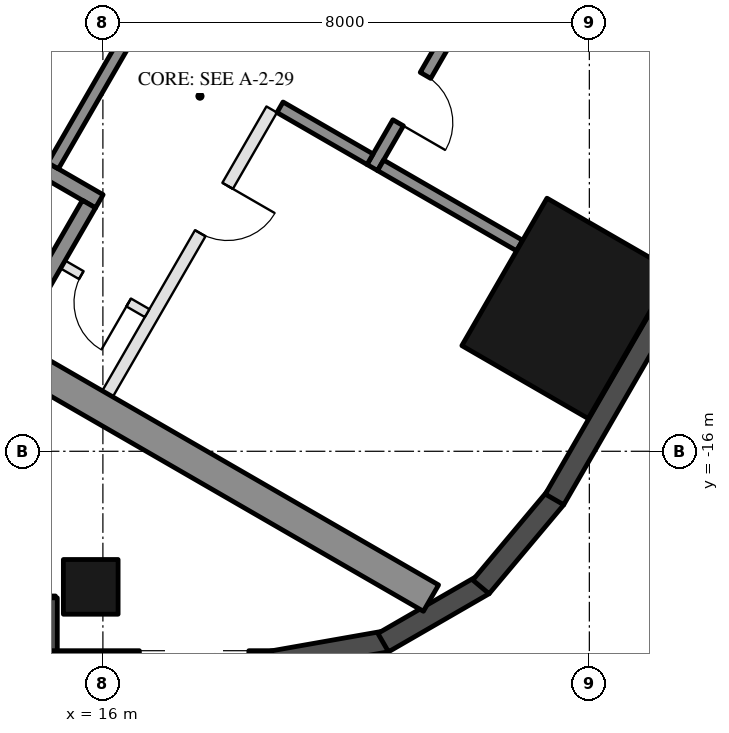
"""IFC4 building model, lengths in metres.
Left out: names, types, materials, properties, quantities, classifications, styles, units other than length and angle.
Written with IfcOpenShell. Run it as: python <this file> out.ifc"""

import sys

from ifc_helpers import new_model, si_unit, direction, frame, frame_2d, origin, origin_2d, place, context, subcontext, project, spatial, rectangle, hollow_rectangle, extrude, element, fill, save


model = new_model("IFC4")
c1 = context("Model", 3, precision=1e-05, world=origin(), true_north=direction((0.0, 1.0)))
c2 = subcontext(c1, "Body", "Model", "MODEL_VIEW")
j1 = project(units=[si_unit("LENGTHUNIT", "METRE"), si_unit("PLANEANGLEUNIT", "RADIAN")], contexts=[c1])
p1 = place(None, origin())
s1 = spatial("IfcSite", under=j1, at=p1, CompositionType="ELEMENT")
p2 = place(p1, origin())
s2 = spatial("IfcBuilding", under=s1, at=p2, CompositionType="ELEMENT")
p3 = place(p2, frame((0.0, 0.0, 127.9)))
s3 = spatial("IfcBuildingStorey", under=s2, at=p3, CompositionType="ELEMENT", Elevation=127.9)
p4 = place(p3, frame((15.8, -18.23, 0.0), z_axis=(0.0, 0.0, 1.0), x_axis=(-1.0, 0.0, 0.0)))
e1 = element("IfcColumn", 1, at=p4, inside=s3, PredefinedType="COLUMN", context=c2, shape_type="SweptSolid", body=[
    extrude(hollow_rectangle(XDim=0.9, YDim=0.9, WallThickness=0.04, at=origin_2d()), origin(), (0.0, 0.0, 1.0), 3.7),
])
p5 = place(p3, frame((23.643, -13.65, 0.0), z_axis=(0.0, 0.0, 1.0), x_axis=(0.5, 0.866025403784, 0.0)))
e2 = element("IfcColumn", 2, at=p5, inside=s3, PredefinedType="COLUMN", context=c2, shape_type="SweptSolid", body=[
    extrude(hollow_rectangle(XDim=2.8, YDim=2.4, WallThickness=0.07, at=origin_2d()), origin(), (0.0, 0.0, 1.0), 3.7),
])
p6 = place(p3, frame((8.48, -18.555, 0.0), z_axis=(0.0, 0.0, 1.0), x_axis=(1.0, 0.0, 0.0)))
e3 = element("IfcWall", 3, at=p6, inside=s3, PredefinedType="SOLIDWALL", context=c2, shape_type="SweptSolid", body=[
    extrude(rectangle(XDim=6.74, YDim=0.35, at=frame_2d((3.37, 0.0))), origin(), (0.0, 0.0, 1.0), 3.45),
])
p7 = place(p6, frame((0.32, 0.0, 0.0)))
e4 = element("IfcOpeningElement", 4, at=p7, cuts=e3, PredefinedType="OPENING", context=c2, shape_type="SweptSolid", body=[
    extrude(rectangle(XDim=2.4, YDim=2.4, at=frame_2d((1.2, 1.2))), frame((0.0, 0.185, 0.0), z_axis=(0.0, -1.0, 0.0), x_axis=(1.0, 0.0, 0.0)), (0.0, 0.0, 1.0), 0.37),
])
p8 = place(p6, frame((3.02, 0.0, 0.3)))
e5 = element("IfcOpeningElement", 5, at=p8, cuts=e3, PredefinedType="OPENING", context=c2, shape_type="SweptSolid", body=[
    extrude(rectangle(XDim=2.9, YDim=2.65, at=frame_2d((1.45, 1.325))), frame((0.0, 0.185, 0.0), z_axis=(0.0, -1.0, 0.0), x_axis=(1.0, 0.0, 0.0)), (0.0, 0.0, 1.0), 0.37),
])
p9 = place(p3, frame((15.075, -18.41, 0.0), z_axis=(0.0, 0.0, 1.0), x_axis=(0.0, -1.0, 0.0)))
e6 = element("IfcWall", 6, at=p9, inside=s3, PredefinedType="SOLIDWALL", context=c2, shape_type="SweptSolid", body=[
    extrude(rectangle(XDim=1.22, YDim=0.35, at=frame_2d((0.61, 0.0))), origin(), (0.0, 0.0, 1.0), 3.45),
])
p10 = place(p3, frame((14.9, -19.455, 0.0), z_axis=(0.0, 0.0, 1.0), x_axis=(1.0, 0.0, 0.0)))
e7 = element("IfcWall", 7, at=p10, inside=s3, PredefinedType="SOLIDWALL", context=c2, shape_type="SweptSolid", body=[
    extrude(rectangle(XDim=3.916, YDim=0.35, at=frame_2d((1.958, 0.0))), origin(), (0.0, 0.0, 1.0), 3.45),
])
p11 = place(p10, frame((1.7, 0.0, 0.3)))
e8 = element("IfcOpeningElement", 8, at=p11, cuts=e7, PredefinedType="OPENING", context=c2, shape_type="SweptSolid", body=[
    extrude(rectangle(XDim=1.8, YDim=2.65, at=frame_2d((0.9, 1.325))), frame((0.0, 0.185, 0.0), z_axis=(0.0, -1.0, 0.0), x_axis=(1.0, 0.0, 0.0)), (0.0, 0.0, 1.0), 0.37),
])
p12 = place(p3, frame((18.785, -19.458, 0.0), z_axis=(0.0, 0.0, 1.0), x_axis=(0.984798995425, 0.173697837091, 0.0)))
e9 = element("IfcWall", 9, at=p12, inside=s3, PredefinedType="SOLIDWALL", context=c2, shape_type="SweptSolid", body=[
    extrude(rectangle(XDim=1.91, YDim=0.35, at=frame_2d((0.955, 0.0))), origin(), (0.0, 0.0, 1.0), 3.45),
])
for number, where, z_axis, x_axis in (
    (10, (20.61, -19.147, 0.0), (0.0, 0.0, 1.0), (0.866, 0.5, 0.0)),
    (11, (22.217, -18.231, 0.0), (0.0, 0.0, 1.0), (0.643, 0.766, 0.0)),
):
    element("IfcWall", number, at=place(p3, frame(where, z_axis=z_axis, x_axis=x_axis)), inside=s3, PredefinedType="SOLIDWALL", context=c2, shape_type="SweptSolid", body=[
        extrude(rectangle(XDim=1.91, YDim=0.35, at=frame_2d((0.955, 0.0))), origin(), (0.0, 0.0, 1.0), 3.45),
    ])
p13 = place(p3, frame((23.427, -16.792, 0.0), z_axis=(0.0, 0.0, 1.0), x_axis=(0.500018773155, 0.866014564827, 0.0)))
e12 = element("IfcWall", 12, at=p13, inside=s3, PredefinedType="SOLIDWALL", context=c2, shape_type="SweptSolid", body=[
    extrude(rectangle(XDim=5.658, YDim=0.35, at=frame_2d((2.829, 0.0))), origin(), (0.0, 0.0, 1.0), 3.45),
])
for number, where, z_axis, x_axis in (
    (13, (8.547, -10.997, 0.0), (0.0, 0.0, 1.0), (0.866, -0.5, 0.0)),
    (14, (13.797, -1.903, 0.0), (0.0, 0.0, 1.0), (0.866, -0.5, 0.0)),
):
    element("IfcWall", number, at=place(p3, frame(where, z_axis=z_axis, x_axis=x_axis)), inside=s3, PredefinedType="SHEAR", context=c2, shape_type="SweptSolid", body=[
        extrude(rectangle(XDim=14.837, YDim=0.5, at=frame_2d((7.418, 0.0))), origin(), (0.0, 0.0, 1.0), 3.45),
    ])
p14 = place(p3, frame((10.356, -8.664, 0.0), z_axis=(0.0, 0.0, 1.0), x_axis=(0.866028629588, -0.499994412703, 0.0)))
e15 = element("IfcWall", 15, at=p14, inside=s3, PredefinedType="SHEAR", context=c2, shape_type="SweptSolid", body=[
    extrude(rectangle(XDim=6.45, YDim=0.25, at=frame_2d((3.225, 0.0))), origin(), (0.0, 0.0, 1.0), 3.45),
])
p15 = place(p14, frame((0.3, 0.0, 0.0)))
e16 = element("IfcOpeningElement", 16, at=p15, cuts=e15, PredefinedType="OPENING", context=c2, shape_type="SweptSolid", body=[
    extrude(rectangle(XDim=1.0, YDim=2.1, at=frame_2d((0.5, 1.05))), frame((0.0, 0.135, 0.0), z_axis=(0.0, -1.0, 0.0), x_axis=(1.0, 0.0, 0.0)), (0.0, 0.0, 1.0), 0.27),
])
p16 = place(p3, frame((14.496, -14.143, 0.0), z_axis=(0.0, 0.0, 1.0), x_axis=(0.500062241894, 0.865989465428, 0.0)))
e17 = element("IfcWall", 17, at=p16, inside=s3, PredefinedType="SHEAR", context=c2, shape_type="SweptSolid", body=[
    extrude(rectangle(XDim=2.55, YDim=0.25, at=frame_2d((1.275, 0.0))), origin(), (0.0, 0.0, 1.0), 3.45),
])
p17 = place(p3, frame((15.181, -11.305, 0.0), z_axis=(0.0, 0.0, 1.0), x_axis=(0.49994636267, 0.866056369097, 0.0)))
e18 = element("IfcWall", 18, at=p17, inside=s3, PredefinedType="SHEAR", context=c2, shape_type="SweptSolid", body=[
    extrude(rectangle(XDim=2.8, YDim=0.2, at=frame_2d((1.4, 0.0))), origin(), (0.0, 0.0, 1.0), 3.45),
])
p18 = place(p3, frame((20.43, -11.333, 0.0), z_axis=(0.0, 0.0, 1.0), x_axis=(0.500001309137, 0.866024647952, 0.0)))
e19 = element("IfcWall", 19, at=p18, inside=s3, PredefinedType="SHEAR", context=c2, shape_type="SweptSolid", body=[
    extrude(rectangle(XDim=2.4, YDim=0.2, at=frame_2d((1.2, 0.0))), origin(), (0.0, 0.0, 1.0), 3.45),
])
p19 = place(p18, frame((0.85, 0.0, 0.0)))
e20 = element("IfcOpeningElement", 20, at=p19, cuts=e19, PredefinedType="OPENING", context=c2, shape_type="SweptSolid", body=[
    extrude(rectangle(XDim=0.9, YDim=2.1, at=frame_2d((0.45, 1.05))), frame((0.0, 0.11, 0.0), z_axis=(0.0, -1.0, 0.0), x_axis=(1.0, 0.0, 0.0)), (0.0, 0.0, 1.0), 0.22),
])
p20 = place(p3, frame((18.913, -10.342, 0.0), z_axis=(0.0, 0.0, 1.0), x_axis=(0.866038183914, -0.499977863513, 0.0)))
e21 = element("IfcWall", 21, at=p20, inside=s3, PredefinedType="SHEAR", context=c2, shape_type="SweptSolid", body=[
    extrude(rectangle(XDim=1.71, YDim=0.2, at=frame_2d((0.855, 0.0))), origin(), (0.0, 0.0, 1.0), 3.45),
])
p21 = place(p3, frame((20.567, -11.297, 0.0), z_axis=(0.0, 0.0, 1.0), x_axis=(0.866060851709, -0.499938597367, 0.0)))
e22 = element("IfcWall", 22, at=p21, inside=s3, PredefinedType="SHEAR", context=c2, shape_type="SweptSolid", body=[
    extrude(rectangle(XDim=2.64, YDim=0.2, at=frame_2d((1.32, 0.0))), origin(), (0.0, 0.0, 1.0), 3.45),
])
p22 = place(p3, frame((16.076, -15.055, 0.0), z_axis=(0.0, 0.0, 1.0), x_axis=(0.499995103361, 0.866028230842, 0.0)))
e23 = element("IfcWall", 23, at=p22, inside=s3, PredefinedType="PARTITIONING", context=c2, shape_type="SweptSolid", body=[
    extrude(rectangle(XDim=5.4, YDim=0.2, at=frame_2d((2.7, 0.0))), origin(), (0.0, 0.0, 1.0), 3.45),
])
p23 = place(p22, frame((3.05, 0.0, 0.0)))
e24 = element("IfcOpeningElement", 24, at=p23, cuts=e23, PredefinedType="OPENING", context=c2, shape_type="SweptSolid", body=[
    extrude(rectangle(XDim=0.9, YDim=2.1, at=frame_2d((0.45, 1.05))), frame((0.0, 0.11, 0.0), z_axis=(0.0, -1.0, 0.0), x_axis=(1.0, 0.0, 0.0)), (0.0, 0.0, 1.0), 0.22),
])
p24 = place(p3, frame((15.342, -12.928, 0.0), z_axis=(0.0, 0.0, 1.0), x_axis=(0.865989903783, -0.500061482766, 0.0)))
e25 = element("IfcWall", 25, at=p24, inside=s3, PredefinedType="PARTITIONING", context=c2, shape_type="SweptSolid", body=[
    extrude(rectangle(XDim=1.6, YDim=0.15, at=frame_2d((0.8, 0.0))), origin(), (0.0, 0.0, 1.0), 3.45),
])
p25 = place(p24, frame((0.35, 0.0, 0.0)))
e26 = element("IfcOpeningElement", 26, at=p25, cuts=e25, PredefinedType="OPENING", context=c2, shape_type="SweptSolid", body=[
    extrude(rectangle(XDim=0.9, YDim=2.1, at=frame_2d((0.45, 1.05))), frame((0.0, 0.085, 0.0), z_axis=(0.0, -1.0, 0.0), x_axis=(1.0, 0.0, 0.0)), (0.0, 0.0, 1.0), 0.17),
])
p26 = place(p25, frame((0.9, 0.0, 0.0), z_axis=(0.0, 0.0, 1.0), x_axis=(-1.0, 0.0, 0.0)))
e27 = element("IfcDoor", 27, at=p26, inside=s3, OperationType="SINGLE_SWING_LEFT", PredefinedType="DOOR", context=c2, shape_type="SweptSolid", body=[
    extrude(rectangle(XDim=0.9, YDim=2.1, at=frame_2d((0.45, 1.05))), frame((0.0, 0.025, 0.0), z_axis=(0.0, -1.0, 0.0), x_axis=(1.0, 0.0, 0.0)), (0.0, 0.0, 1.0), 0.05),
])
fill(e26, e27)
p27 = place(p19, frame((0.9, 0.0, 0.0), z_axis=(0.0, 0.0, 1.0), x_axis=(-1.0, 0.0, 0.0)))
e28 = element("IfcDoor", 28, at=p27, inside=s3, OperationType="SINGLE_SWING_RIGHT", PredefinedType="DOOR", context=c2, shape_type="SweptSolid", body=[
    extrude(rectangle(XDim=0.9, YDim=2.1, at=frame_2d((0.45, 1.05))), frame((0.0, 0.025, 0.0), z_axis=(0.0, -1.0, 0.0), x_axis=(1.0, 0.0, 0.0)), (0.0, 0.0, 1.0), 0.05),
])
fill(e20, e28)
p28 = place(p23, frame((0.9, 0.0, 0.0), z_axis=(0.0, 0.0, 1.0), x_axis=(-1.0, 0.0, 0.0)))
e29 = element("IfcDoor", 29, at=p28, inside=s3, OperationType="SINGLE_SWING_LEFT", PredefinedType="DOOR", context=c2, shape_type="SweptSolid", body=[
    extrude(rectangle(XDim=0.9, YDim=2.1, at=frame_2d((0.45, 1.05))), frame((0.0, 0.025, 0.0), z_axis=(0.0, -1.0, 0.0), x_axis=(1.0, 0.0, 0.0)), (0.0, 0.0, 1.0), 0.05),
])
fill(e24, e29)
save(model, sys.argv[1])
